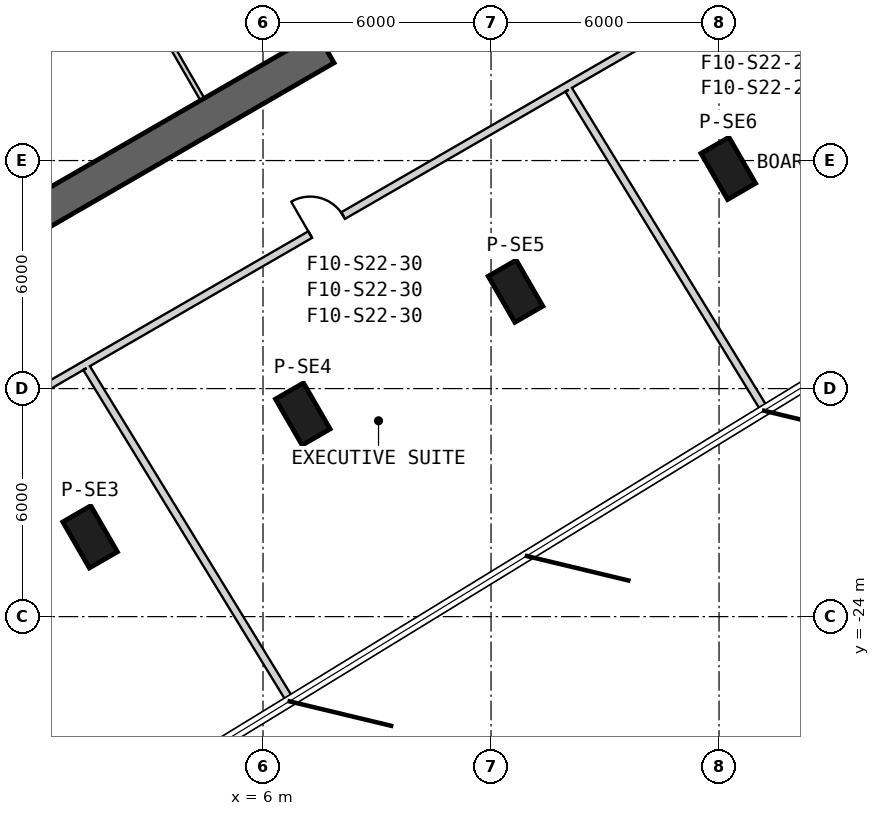
"""IFC4 building model, lengths in metres.
Left out: names, types, materials, properties, quantities, classifications, styles, units other than length and angle.
Written with IfcOpenShell. Run it as: python <this file> out.ifc"""

import sys

from ifc_helpers import new_model, si_unit, direction, frame, frame_2d, origin, origin_2d, place, context, subcontext, project, spatial, rectangle, extrude, element, fill, save


model = new_model("IFC4")
c1 = context("Model", 3, precision=1e-05, world=origin(), true_north=direction((0.0, 1.0)))
c2 = subcontext(c1, "Body", "Model", "MODEL_VIEW")
j1 = project(units=[si_unit("LENGTHUNIT", "METRE"), si_unit("PLANEANGLEUNIT", "RADIAN")], contexts=[c1])
p1 = place(None, origin())
s1 = spatial("IfcSite", under=j1, at=p1, CompositionType="ELEMENT")
p2 = place(p1, origin())
s2 = spatial("IfcBuilding", under=s1, at=p2, CompositionType="ELEMENT")
p3 = place(p2, frame((0.0, 0.0, 345.5)))
s3 = spatial("IfcBuildingStorey", under=s2, at=p3, CompositionType="ELEMENT", Elevation=345.5)
for number, where, z_axis, x_axis in (
    (1, (1.449, -21.902, 0.0), (0.0, 0.0, 1.0), (0.5, -0.866, 0.0)),
    (2, (7.047, -18.669, 0.0), (0.0, 0.0, 1.0), (0.5, -0.866, 0.0)),
    (3, (12.645, -15.438, 0.0), (0.0, 0.0, 1.0), (0.5, -0.866, 0.0)),
    (4, (18.243, -12.206, 0.0), (0.0, 0.0, 1.0), (0.5, -0.866, 0.0)),
):
    element("IfcColumn", number, at=place(p3, frame(where, z_axis=z_axis, x_axis=x_axis)), inside=s3, PredefinedType="COLUMN", context=c2, shape_type="SweptSolid", body=[
        extrude(rectangle(XDim=1.4, YDim=0.85, at=origin_2d()), origin(), (0.0, 0.0, 1.0), 3.9),
    ])
p4 = place(p3, frame((-7.825, -17.97, 0.0), z_axis=(0.0, 0.0, 1.0), x_axis=(0.866028369851, 0.499994862586, 0.0)))
e5 = element("IfcWall", 5, at=p4, inside=s3, PredefinedType="SHEAR", context=c2, shape_type="SweptSolid", body=[
    extrude(rectangle(XDim=31.523, YDim=0.9, at=frame_2d((15.762, 0.0))), origin(), (0.0, 0.0, 1.0), 3.9),
])
p5 = place(p4, frame((17.862, 0.0, 0.0)))
e6 = element("IfcOpeningElement", 6, at=p5, cuts=e5, PredefinedType="OPENING", context=c2, shape_type="SweptSolid", body=[
    extrude(rectangle(XDim=1.2, YDim=2.4, at=frame_2d((0.6, 1.2))), frame((0.0, 0.46, 0.0), z_axis=(0.0, -1.0, 0.0), x_axis=(1.0, 0.0, 0.0)), (0.0, 0.0, 1.0), 0.92),
])
p6 = place(p4, frame((20.562, 0.0, 0.0)))
e7 = element("IfcOpeningElement", 7, at=p6, cuts=e5, PredefinedType="OPENING", context=c2, shape_type="SweptSolid", body=[
    extrude(rectangle(XDim=1.2, YDim=2.4, at=frame_2d((0.6, 1.2))), frame((0.0, 0.46, 0.0), z_axis=(0.0, -1.0, 0.0), x_axis=(1.0, 0.0, 0.0)), (0.0, 0.0, 1.0), 0.92),
])
p7 = place(p4, frame((26.712, 0.0, 0.0)))
e8 = element("IfcOpeningElement", 8, at=p7, cuts=e5, PredefinedType="OPENING", context=c2, shape_type="SweptSolid", body=[
    extrude(rectangle(XDim=1.2, YDim=2.4, at=frame_2d((0.6, 1.2))), frame((0.0, 0.46, 0.0), z_axis=(0.0, -1.0, 0.0), x_axis=(1.0, 0.0, 0.0)), (0.0, 0.0, 1.0), 0.92),
])
p8 = place(p4, frame((3.612, 0.0, 0.0)))
e9 = element("IfcOpeningElement", 9, at=p8, cuts=e5, PredefinedType="OPENING", context=c2, shape_type="SweptSolid", body=[
    extrude(rectangle(XDim=1.2, YDim=2.4, at=frame_2d((0.6, 1.2))), frame((0.0, 0.46, 0.0), z_axis=(0.0, -1.0, 0.0), x_axis=(1.0, 0.0, 0.0)), (0.0, 0.0, 1.0), 0.92),
])
p9 = place(p3, frame((4.405, -10.389, 0.0), z_axis=(0.0, 0.0, 1.0), x_axis=(-0.500017246033, 0.866015446554, 0.0)))
e10 = element("IfcWall", 10, at=p9, inside=s3, PredefinedType="PARTITIONING", context=c2, shape_type="SweptSolid", body=[
    extrude(rectangle(XDim=3.25, YDim=0.12, at=frame_2d((1.625, 0.0))), origin(), (0.0, 0.0, 1.0), 3.6),
])
p10 = place(p3, frame((0.493, -8.895, 0.0), z_axis=(0.0, 0.0, 1.0), x_axis=(-0.866027945518, -0.499995597562, 0.0)))
e11 = element("IfcWall", 11, at=p10, inside=s3, PredefinedType="PARTITIONING", context=c2, shape_type="SweptSolid", body=[
    extrude(rectangle(XDim=1.702, YDim=0.12, at=frame_2d((0.851, 0.0))), origin(), (0.0, 0.0, 1.0), 3.6),
])
p11 = place(p10, frame((0.461, 0.0, 0.0)))
e12 = element("IfcOpeningElement", 12, at=p11, cuts=e11, PredefinedType="OPENING", context=c2, shape_type="SweptSolid", body=[
    extrude(rectangle(XDim=0.8, YDim=2.1, at=frame_2d((0.4, 1.05))), frame((0.0, 0.07, 0.0), z_axis=(0.0, -1.0, 0.0), x_axis=(1.0, 0.0, 0.0)), (0.0, 0.0, 1.0), 0.14),
])
p12 = place(p3, frame((-6.505, -21.885, 0.0), z_axis=(0.0, 0.0, 1.0), x_axis=(0.86602457258, 0.500001439686, 0.0)))
e13 = element("IfcWall", 13, at=p12, inside=s3, PredefinedType="PARTITIONING", context=c2, shape_type="SweptSolid", body=[
    extrude(rectangle(XDim=32.952, YDim=0.2, at=frame_2d((16.476, 0.0))), origin(), (0.0, 0.0, 1.0), 2.97),
])
p13 = place(p12, frame((27.839, 0.0, 0.0)))
e14 = element("IfcOpeningElement", 14, at=p13, cuts=e13, PredefinedType="OPENING", context=c2, shape_type="SweptSolid", body=[
    extrude(rectangle(XDim=1.0, YDim=2.1, at=frame_2d((0.5, 1.05))), frame((0.0, 0.11, 0.0), z_axis=(0.0, -1.0, 0.0), x_axis=(1.0, 0.0, 0.0)), (0.0, 0.0, 1.0), 0.22),
])
p14 = place(p12, frame((15.873, 0.0, 0.0)))
e15 = element("IfcOpeningElement", 15, at=p14, cuts=e13, PredefinedType="OPENING", context=c2, shape_type="SweptSolid", body=[
    extrude(rectangle(XDim=1.0, YDim=2.1, at=frame_2d((0.5, 1.05))), frame((0.0, 0.11, 0.0), z_axis=(0.0, -1.0, 0.0), x_axis=(1.0, 0.0, 0.0)), (0.0, 0.0, 1.0), 0.22),
])
p15 = place(p12, frame((4.06, 0.0, 0.0)))
e16 = element("IfcOpeningElement", 16, at=p15, cuts=e13, PredefinedType="OPENING", context=c2, shape_type="SweptSolid", body=[
    extrude(rectangle(XDim=1.0, YDim=2.1, at=frame_2d((0.5, 1.05))), frame((0.0, 0.11, 0.0), z_axis=(0.0, -1.0, 0.0), x_axis=(1.0, 0.0, 0.0)), (0.0, 0.0, 1.0), 0.22),
])
p16 = place(p3, frame((14.042, -10.137, 0.0), z_axis=(0.0, 0.0, 1.0), x_axis=(0.522290974672, -0.852767340941, 0.0)))
e17 = element("IfcWall", 17, at=p16, inside=s3, PredefinedType="PARTITIONING", context=c2, shape_type="SweptSolid", body=[
    extrude(rectangle(XDim=9.885, YDim=0.2, at=frame_2d((4.942, 0.0))), origin(), (0.0, 0.0, 1.0), 3.6),
])
p17 = place(p3, frame((6.719, -26.213, 0.0), z_axis=(0.0, 0.0, 1.0), x_axis=(-0.522271430508, 0.852779310769, 0.0)))
e18 = element("IfcWall", 18, at=p17, inside=s3, PredefinedType="PARTITIONING", context=c2, shape_type="SweptSolid", body=[
    extrude(rectangle(XDim=10.264, YDim=0.2, at=frame_2d((5.132, 0.0))), origin(), (0.0, 0.0, 1.0), 3.6),
])
p18 = place(p14, origin())
e19 = element("IfcDoor", 19, at=p18, inside=s3, OperationType="SINGLE_SWING_RIGHT", PredefinedType="USERDEFINED", context=c2, shape_type="SweptSolid", body=[
    extrude(rectangle(XDim=1.0, YDim=2.1, at=frame_2d((0.5, 1.05))), frame((0.0, 0.025, 0.0), z_axis=(0.0, -1.0, 0.0), x_axis=(1.0, 0.0, 0.0)), (0.0, 0.0, 1.0), 0.05),
])
fill(e15, e19)
save(model, sys.argv[1])
